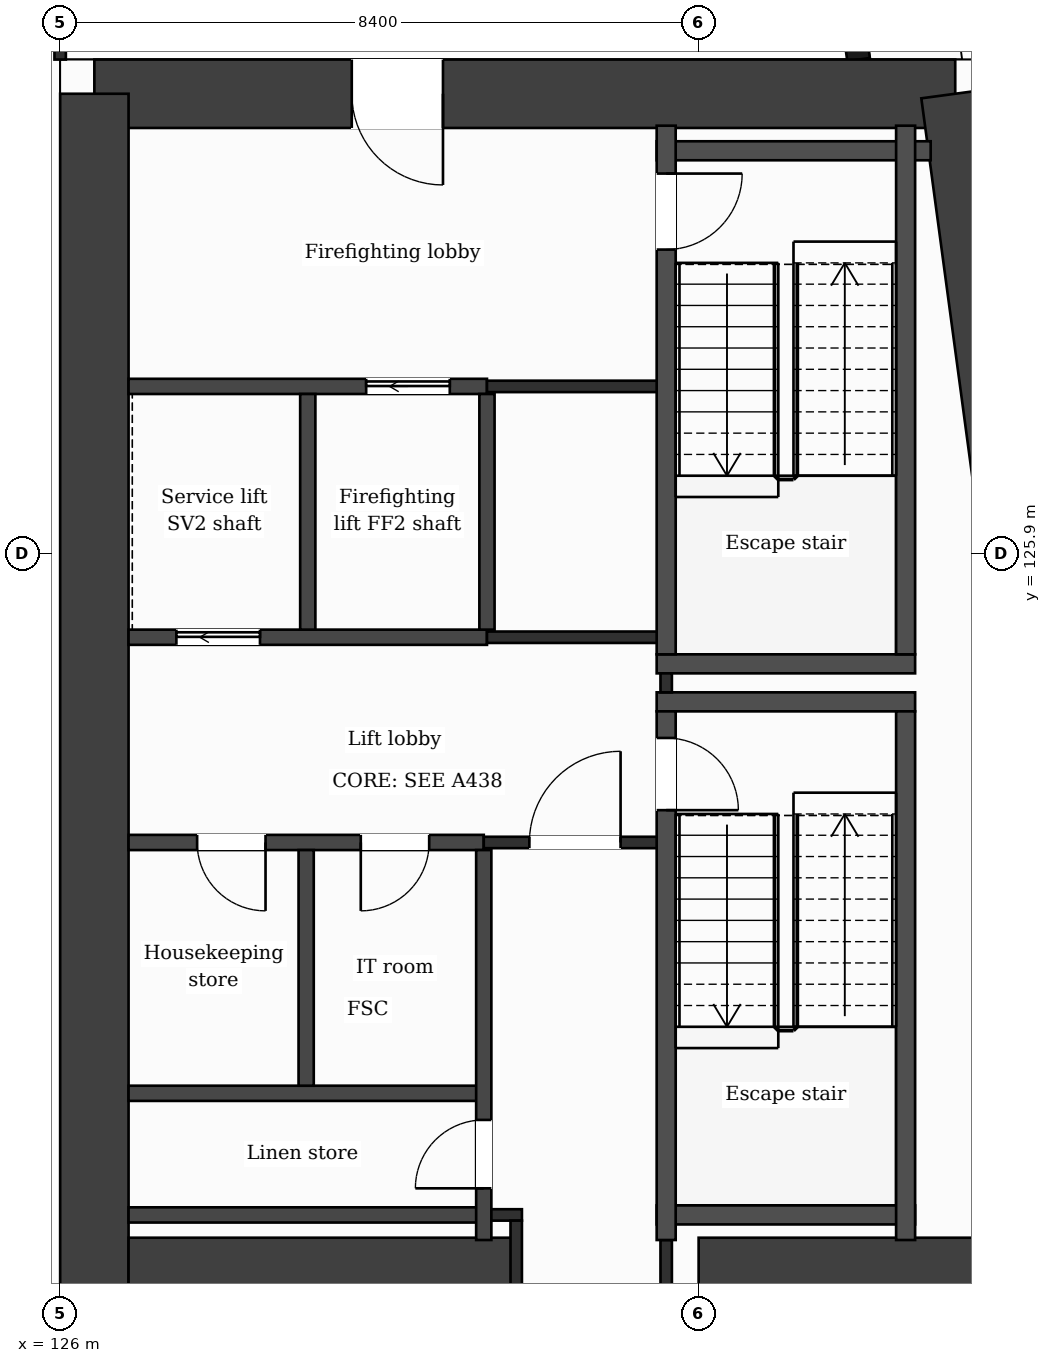
"""IFC4 building model, lengths in metres.
Left out: names, types, materials, properties, quantities, classifications, styles, units other than length and angle.
Written with IfcOpenShell. Run it as: python <this file> out.ifc"""

import sys

from ifc_helpers import new_model, si_unit, direction, frame, frame_2d, origin, place, context, subcontext, project, spatial, rectangle, extrude, element, fill, save


model = new_model("IFC4")
c1 = context("Model", 3, precision=1e-05, world=origin(), true_north=direction((0.0, 1.0)))
c2 = subcontext(c1, "Body", "Model", "MODEL_VIEW")
j1 = project(units=[si_unit("LENGTHUNIT", "METRE"), si_unit("PLANEANGLEUNIT", "RADIAN")], contexts=[c1])
p1 = place(None, origin())
s1 = spatial("IfcSite", under=j1, at=p1, CompositionType="ELEMENT")
p2 = place(p1, origin())
s2 = spatial("IfcBuilding", under=s1, at=p2, CompositionType="ELEMENT")
p3 = place(p2, frame((0.0, 0.0, 158.9)))
s3 = spatial("IfcBuildingStorey", under=s2, at=p3, CompositionType="ELEMENT", Elevation=158.9)
p4 = place(p3, frame((126.45, 131.95, 0.0), z_axis=(0.0, 0.0, 1.0), x_axis=(1.0, 0.0, 0.0)))
e1 = element("IfcWall", 1, at=p4, inside=s3, PredefinedType="SHEAR", context=c2, shape_type="SweptSolid", body=[
    extrude(rectangle(XDim=11.326, YDim=0.9, at=frame_2d((5.663, 0.0))), origin(), (0.0, 0.0, 1.0), 3.7),
])
p5 = place(p4, frame((3.386, 0.0, 0.0)))
e2 = element("IfcOpeningElement", 2, at=p5, cuts=e1, PredefinedType="OPENING", context=c2, shape_type="SweptSolid", body=[
    extrude(rectangle(XDim=1.2, YDim=2.1, at=frame_2d((0.6, 1.05))), frame((0.0, 0.46, 0.0), z_axis=(0.0, -1.0, 0.0), x_axis=(1.0, 0.0, 0.0)), (0.0, 0.0, 1.0), 0.92),
])
p6 = place(p3, frame((137.776, 131.95, 0.0), z_axis=(0.0, 0.0, 1.0), x_axis=(0.133421759112, -0.991059349482, 0.0)))
e3 = element("IfcWall", 3, at=p6, inside=s3, PredefinedType="SHEAR", context=c2, shape_type="SweptSolid", body=[
    extrude(rectangle(XDim=21.29, YDim=0.9, at=frame_2d((10.645, 0.0))), origin(), (0.0, 0.0, 1.0), 3.7),
])
p7 = place(p3, frame((126.45, 110.85, 0.0), z_axis=(0.0, 0.0, 1.0), x_axis=(0.0, 1.0, 0.0)))
e4 = element("IfcWall", 4, at=p7, inside=s3, PredefinedType="SHEAR", context=c2, shape_type="SweptSolid", body=[
    extrude(rectangle(XDim=21.1, YDim=0.9, at=frame_2d((10.55, 0.0))), origin(), (0.0, 0.0, 1.0), 3.7),
])
p8 = place(p3, frame((126.9, 116.45, 0.0), z_axis=(0.0, 0.0, 1.0), x_axis=(1.0, 0.0, 0.0)))
e5 = element("IfcWall", 5, at=p8, inside=s3, PredefinedType="SHEAR", context=c2, shape_type="SweptSolid", body=[
    extrude(rectangle(XDim=5.1, YDim=0.9, at=frame_2d((2.55, 0.0))), origin(), (0.0, 0.0, 1.0), 3.7),
])
p9 = place(p3, frame((134.4, 116.45, 0.0), z_axis=(0.0, 0.0, 1.0), x_axis=(1.0, 0.0, 0.0)))
e6 = element("IfcWall", 6, at=p9, inside=s3, PredefinedType="SHEAR", context=c2, shape_type="SweptSolid", body=[
    extrude(rectangle(XDim=5.077, YDim=0.9, at=frame_2d((2.539, 0.0))), origin(), (0.0, 0.0, 1.0), 3.7),
])
p10 = place(p3, frame((136.504, 132.4, 0.0), z_axis=(0.0, 0.0, 1.0), x_axis=(-0.133399697462, 0.99106231929, 0.0)))
e7 = element("IfcWall", 7, at=p10, inside=s3, PredefinedType="SOLIDWALL", context=c2, shape_type="SweptSolid", body=[
    extrude(rectangle(XDim=6.74, YDim=0.3, at=frame_2d((3.37, 0.0))), origin(), (0.0, 0.0, 1.0), 3.38),
])
p11 = place(p10, frame((1.115, 0.0, 0.0)))
e8 = element("IfcOpeningElement", 8, at=p11, cuts=e7, PredefinedType="OPENING", context=c2, shape_type="SweptSolid", body=[
    extrude(rectangle(XDim=1.2, YDim=2.4, at=frame_2d((0.6, 1.2))), frame((0.0, 0.16, 0.0), z_axis=(0.0, -1.0, 0.0), x_axis=(1.0, 0.0, 0.0)), (0.0, 0.0, 1.0), 0.32),
])
p12 = place(p10, frame((4.436, 0.0, 0.9)))
e9 = element("IfcOpeningElement", 9, at=p12, cuts=e7, PredefinedType="OPENING", context=c2, shape_type="SweptSolid", body=[
    extrude(rectangle(XDim=1.2, YDim=2.1, at=frame_2d((0.6, 1.05))), frame((0.0, 0.16, 0.0), z_axis=(0.0, -1.0, 0.0), x_axis=(1.0, 0.0, 0.0)), (0.0, 0.0, 1.0), 0.32),
])
p13 = place(p3, frame((126.9, 117.2, 0.0), z_axis=(0.0, 0.0, 1.0), x_axis=(1.0, 0.0, 0.0)))
e10 = element("IfcWall", 10, at=p13, inside=s3, PredefinedType="PARTITIONING", context=c2, shape_type="SweptSolid", body=[
    extrude(rectangle(XDim=4.673, YDim=0.2, at=frame_2d((2.336, 0.0))), origin(), (0.0, 0.0, 1.0), 3.38),
])
p14 = place(p3, frame((131.573, 117.2, 0.0), z_axis=(0.0, 0.0, 1.0), x_axis=(1.0, 0.0, 0.0)))
e11 = element("IfcWall", 11, at=p14, inside=s3, PredefinedType="PARTITIONING", context=c2, shape_type="SweptSolid", body=[
    extrude(rectangle(XDim=0.502, YDim=0.15, at=frame_2d((0.251, 0.0))), origin(), (0.0, 0.0, 1.0), 3.38),
])
p15 = place(p3, frame((133.848, 117.2, 0.0), z_axis=(0.0, 0.0, 1.0), x_axis=(1.0, 0.0, 0.0)))
e12 = element("IfcWall", 12, at=p15, inside=s3, PredefinedType="PARTITIONING", context=c2, shape_type="SweptSolid", body=[
    extrude(rectangle(XDim=3.4, YDim=0.25, at=frame_2d((1.7, 0.0))), origin(), (0.0, 0.0, 1.0), 3.38),
])
p16 = place(p3, frame((126.9, 118.8, 0.0), z_axis=(0.0, 0.0, 1.0), x_axis=(1.0, 0.0, 0.0)))
e13 = element("IfcWall", 13, at=p16, inside=s3, PredefinedType="PARTITIONING", context=c2, shape_type="SweptSolid", body=[
    extrude(rectangle(XDim=4.673, YDim=0.2, at=frame_2d((2.336, 0.0))), origin(), (0.0, 0.0, 1.0), 3.38),
])
p17 = place(p3, frame((126.9, 122.1, 0.0), z_axis=(0.0, 0.0, 1.0), x_axis=(1.0, 0.0, 0.0)))
e14 = element("IfcWall", 14, at=p17, inside=s3, PredefinedType="PARTITIONING", context=c2, shape_type="SweptSolid", body=[
    extrude(rectangle(XDim=4.673, YDim=0.2, at=frame_2d((2.336, 0.0))), origin(), (0.0, 0.0, 1.0), 3.38),
])
p18 = place(p17, frame((3.055, 0.0, 0.0)))
e15 = element("IfcOpeningElement", 15, at=p18, cuts=e14, PredefinedType="OPENING", context=c2, shape_type="SweptSolid", body=[
    extrude(rectangle(XDim=0.9, YDim=2.1, at=frame_2d((0.45, 1.05))), frame((0.0, 0.11, 0.0), z_axis=(0.0, -1.0, 0.0), x_axis=(1.0, 0.0, 0.0)), (0.0, 0.0, 1.0), 0.22),
])
p19 = place(p17, frame((0.902, 0.0, 0.0)))
e16 = element("IfcOpeningElement", 16, at=p19, cuts=e14, PredefinedType="OPENING", context=c2, shape_type="SweptSolid", body=[
    extrude(rectangle(XDim=0.9, YDim=2.1, at=frame_2d((0.45, 1.05))), frame((0.0, 0.11, 0.0), z_axis=(0.0, -1.0, 0.0), x_axis=(1.0, 0.0, 0.0)), (0.0, 0.0, 1.0), 0.22),
])
p20 = place(p3, frame((131.573, 122.1, 0.0), z_axis=(0.0, 0.0, 1.0), x_axis=(1.0, 0.0, 0.0)))
e17 = element("IfcWall", 17, at=p20, inside=s3, PredefinedType="PARTITIONING", context=c2, shape_type="SweptSolid", body=[
    extrude(rectangle(XDim=2.4, YDim=0.15, at=frame_2d((1.2, 0.0))), origin(), (0.0, 0.0, 1.0), 3.38),
])
p21 = place(p20, frame((0.6, 0.0, 0.0)))
e18 = element("IfcOpeningElement", 18, at=p21, cuts=e17, PredefinedType="OPENING", context=c2, shape_type="SweptSolid", body=[
    extrude(rectangle(XDim=1.2, YDim=2.1, at=frame_2d((0.6, 1.05))), frame((0.0, 0.085, 0.0), z_axis=(0.0, -1.0, 0.0), x_axis=(1.0, 0.0, 0.0)), (0.0, 0.0, 1.0), 0.17),
])
for number, where, z_axis, x_axis in (
    (19, (133.848, 123.95, 0.0), (0.0, 0.0, 1.0), (1.0, 0.0, 0.0)),
    (20, (133.848, 124.45, 0.0), (0.0, 0.0, 1.0), (1.0, 0.0, 0.0)),
):
    element("IfcWall", number, at=place(p3, frame(where, z_axis=z_axis, x_axis=x_axis)), inside=s3, PredefinedType="PARTITIONING", context=c2, shape_type="SweptSolid", body=[
        extrude(rectangle(XDim=3.4, YDim=0.25, at=frame_2d((1.7, 0.0))), origin(), (0.0, 0.0, 1.0), 3.38),
    ])
p22 = place(p3, frame((126.9, 124.8, 0.0), z_axis=(0.0, 0.0, 1.0), x_axis=(1.0, 0.0, 0.0)))
e21 = element("IfcWall", 21, at=p22, inside=s3, PredefinedType="PARTITIONING", context=c2, shape_type="SweptSolid", body=[
    extrude(rectangle(XDim=4.715, YDim=0.2, at=frame_2d((2.358, 0.0))), origin(), (0.0, 0.0, 1.0), 3.38),
])
p23 = place(p22, frame((0.629, 0.0, 0.0)))
e22 = element("IfcOpeningElement", 22, at=p23, cuts=e21, PredefinedType="OPENING", context=c2, shape_type="SweptSolid", body=[
    extrude(rectangle(XDim=1.1, YDim=2.1, at=frame_2d((0.55, 1.05))), frame((0.0, 0.11, 0.0), z_axis=(0.0, -1.0, 0.0), x_axis=(1.0, 0.0, 0.0)), (0.0, 0.0, 1.0), 0.22),
])
p24 = place(p3, frame((131.615, 124.8, 0.0), z_axis=(0.0, 0.0, 1.0), x_axis=(1.0, 0.0, 0.0)))
e23 = element("IfcWall", 23, at=p24, inside=s3, PredefinedType="PARTITIONING", context=c2, shape_type="SweptSolid", body=[
    extrude(rectangle(XDim=2.483, YDim=0.15, at=frame_2d((1.241, 0.0))), origin(), (0.0, 0.0, 1.0), 3.38),
])
p25 = place(p3, frame((126.9, 128.1, 0.0), z_axis=(0.0, 0.0, 1.0), x_axis=(1.0, 0.0, 0.0)))
e24 = element("IfcWall", 24, at=p25, inside=s3, PredefinedType="PARTITIONING", context=c2, shape_type="SweptSolid", body=[
    extrude(rectangle(XDim=4.715, YDim=0.2, at=frame_2d((2.358, 0.0))), origin(), (0.0, 0.0, 1.0), 3.38),
])
p26 = place(p25, frame((3.126, 0.0, 0.0)))
e25 = element("IfcOpeningElement", 25, at=p26, cuts=e24, PredefinedType="OPENING", context=c2, shape_type="SweptSolid", body=[
    extrude(rectangle(XDim=1.1, YDim=2.1, at=frame_2d((0.55, 1.05))), frame((0.0, 0.11, 0.0), z_axis=(0.0, -1.0, 0.0), x_axis=(1.0, 0.0, 0.0)), (0.0, 0.0, 1.0), 0.22),
])
p27 = place(p3, frame((131.615, 128.1, 0.0), z_axis=(0.0, 0.0, 1.0), x_axis=(1.0, 0.0, 0.0)))
e26 = element("IfcWall", 26, at=p27, inside=s3, PredefinedType="PARTITIONING", context=c2, shape_type="SweptSolid", body=[
    extrude(rectangle(XDim=2.358, YDim=0.15, at=frame_2d((1.179, 0.0))), origin(), (0.0, 0.0, 1.0), 3.38),
])
p28 = place(p3, frame((133.848, 131.2, 0.0), z_axis=(0.0, 0.0, 1.0), x_axis=(1.0, 0.0, 0.0)))
e27 = element("IfcWall", 27, at=p28, inside=s3, PredefinedType="PARTITIONING", context=c2, shape_type="SweptSolid", body=[
    extrude(rectangle(XDim=3.605, YDim=0.25, at=frame_2d((1.802, 0.0))), origin(), (0.0, 0.0, 1.0), 3.38),
])
p29 = place(p3, frame((126.0, 132.4, 0.0), z_axis=(0.0, 0.0, 1.0), x_axis=(0.0, 1.0, 0.0)))
e28 = element("IfcWall", 28, at=p29, inside=s3, PredefinedType="PARTITIONING", context=c2, shape_type="SweptSolid", body=[
    extrude(rectangle(XDim=1.325, YDim=0.15, at=frame_2d((0.663, 0.0))), origin(), (0.0, 0.0, 1.0), 3.38),
])
for number, where, z_axis, x_axis in (
    (29, (129.237, 118.9, 0.0), (0.0, 0.0, 1.0), (0.0, 1.0, 0.0)),
    (30, (129.258, 124.9, 0.0), (0.0, 0.0, 1.0), (0.0, 1.0, 0.0)),
):
    element("IfcWall", number, at=place(p3, frame(where, z_axis=z_axis, x_axis=x_axis)), inside=s3, PredefinedType="PARTITIONING", context=c2, shape_type="SweptSolid", body=[
        extrude(rectangle(XDim=3.1, YDim=0.2, at=frame_2d((1.55, 0.0))), origin(), (0.0, 0.0, 1.0), 3.38),
    ])
p30 = place(p3, frame((131.573, 116.87, 0.0), z_axis=(0.0, 0.0, 1.0), x_axis=(0.0, 1.0, 0.0)))
e31 = element("IfcWall", 31, at=p30, inside=s3, PredefinedType="PARTITIONING", context=c2, shape_type="SweptSolid", body=[
    extrude(rectangle(XDim=5.13, YDim=0.2, at=frame_2d((2.565, 0.0))), origin(), (0.0, 0.0, 1.0), 3.38),
])
p31 = place(p30, frame((0.68, 0.0, 0.0)))
e32 = element("IfcOpeningElement", 32, at=p31, cuts=e31, PredefinedType="OPENING", context=c2, shape_type="SweptSolid", body=[
    extrude(rectangle(XDim=0.9, YDim=2.1, at=frame_2d((0.45, 1.05))), frame((0.0, 0.11, 0.0), z_axis=(0.0, -1.0, 0.0), x_axis=(1.0, 0.0, 0.0)), (0.0, 0.0, 1.0), 0.22),
])
p32 = place(p3, frame((131.615, 124.9, 0.0), z_axis=(0.0, 0.0, 1.0), x_axis=(0.0, 1.0, 0.0)))
e33 = element("IfcWall", 33, at=p32, inside=s3, PredefinedType="PARTITIONING", context=c2, shape_type="SweptSolid", body=[
    extrude(rectangle(XDim=3.1, YDim=0.2, at=frame_2d((1.55, 0.0))), origin(), (0.0, 0.0, 1.0), 3.38),
])
p33 = place(p3, frame((132.0, 116.0, 0.0), z_axis=(0.0, 0.0, 1.0), x_axis=(0.0, 1.0, 0.0)))
e34 = element("IfcWall", 34, at=p33, inside=s3, PredefinedType="PARTITIONING", context=c2, shape_type="SweptSolid", body=[
    extrude(rectangle(XDim=1.125, YDim=0.15, at=frame_2d((0.562, 0.0))), origin(), (0.0, 0.0, 1.0), 3.38),
])
p34 = place(p3, frame((133.973, 116.0, 0.0), z_axis=(0.0, 0.0, 1.0), x_axis=(0.0, 1.0, 0.0)))
e35 = element("IfcWall", 35, at=p34, inside=s3, PredefinedType="PARTITIONING", context=c2, shape_type="SweptSolid", body=[
    extrude(rectangle(XDim=0.87, YDim=0.15, at=frame_2d((0.435, 0.0))), origin(), (0.0, 0.0, 1.0), 3.38),
])
p35 = place(p3, frame((133.973, 124.075, 0.0), z_axis=(0.0, 0.0, 1.0), x_axis=(0.0, 1.0, 0.0)))
e36 = element("IfcWall", 36, at=p35, inside=s3, PredefinedType="PARTITIONING", context=c2, shape_type="SweptSolid", body=[
    extrude(rectangle(XDim=0.25, YDim=0.15, at=frame_2d((0.125, 0.0))), origin(), (0.0, 0.0, 1.0), 3.38),
])
p36 = place(p3, frame((133.973, 116.87, 0.0), z_axis=(0.0, 0.0, 1.0), x_axis=(0.0, 1.0, 0.0)))
e37 = element("IfcWall", 37, at=p36, inside=s3, PredefinedType="PARTITIONING", context=c2, shape_type="SweptSolid", body=[
    extrude(rectangle(XDim=6.955, YDim=0.25, at=frame_2d((3.478, 0.0))), origin(), (0.0, 0.0, 1.0), 3.38),
])
p37 = place(p36, frame((5.655, 0.0, 0.0)))
e38 = element("IfcOpeningElement", 38, at=p37, cuts=e37, PredefinedType="OPENING", context=c2, shape_type="SweptSolid", body=[
    extrude(rectangle(XDim=0.95, YDim=2.1, at=frame_2d((0.475, 1.05))), frame((0.0, 0.135, 0.0), z_axis=(0.0, -1.0, 0.0), x_axis=(1.0, 0.0, 0.0)), (0.0, 0.0, 1.0), 0.27),
])
p38 = place(p3, frame((133.973, 124.575, 0.0), z_axis=(0.0, 0.0, 1.0), x_axis=(0.0, 1.0, 0.0)))
e39 = element("IfcWall", 39, at=p38, inside=s3, PredefinedType="PARTITIONING", context=c2, shape_type="SweptSolid", body=[
    extrude(rectangle(XDim=6.955, YDim=0.25, at=frame_2d((3.478, 0.0))), origin(), (0.0, 0.0, 1.0), 3.38),
])
p39 = place(p38, frame((5.325, 0.0, 0.0)))
e40 = element("IfcOpeningElement", 40, at=p39, cuts=e39, PredefinedType="OPENING", context=c2, shape_type="SweptSolid", body=[
    extrude(rectangle(XDim=1.0, YDim=2.1, at=frame_2d((0.5, 1.05))), frame((0.0, 0.135, 0.0), z_axis=(0.0, -1.0, 0.0), x_axis=(1.0, 0.0, 0.0)), (0.0, 0.0, 1.0), 0.27),
])
p40 = place(p3, frame((137.123, 116.87, 0.0), z_axis=(0.0, 0.0, 1.0), x_axis=(0.0, 1.0, 0.0)))
e41 = element("IfcWall", 41, at=p40, inside=s3, PredefinedType="PARTITIONING", context=c2, shape_type="SweptSolid", body=[
    extrude(rectangle(XDim=6.955, YDim=0.25, at=frame_2d((3.478, 0.0))), origin(), (0.0, 0.0, 1.0), 3.38),
])
p41 = place(p3, frame((137.123, 124.575, 0.0), z_axis=(0.0, 0.0, 1.0), x_axis=(0.0, 1.0, 0.0)))
e42 = element("IfcWall", 42, at=p41, inside=s3, PredefinedType="PARTITIONING", context=c2, shape_type="SweptSolid", body=[
    extrude(rectangle(XDim=6.955, YDim=0.25, at=frame_2d((3.478, 0.0))), origin(), (0.0, 0.0, 1.0), 3.38),
])
p42 = place(p21, origin())
e43 = element("IfcDoor", 43, at=p42, inside=s3, OperationType="SINGLE_SWING_RIGHT", PredefinedType="DOOR", context=c2, shape_type="SweptSolid", body=[
    extrude(rectangle(XDim=1.2, YDim=2.1, at=frame_2d((0.6, 1.05))), frame((0.0, 0.025, 0.0), z_axis=(0.0, -1.0, 0.0), x_axis=(1.0, 0.0, 0.0)), (0.0, 0.0, 1.0), 0.05),
])
fill(e18, e43)
p43 = place(p26, origin())
e44 = element("IfcDoor", 44, at=p43, inside=s3, OperationType="SLIDING_TO_LEFT", PredefinedType="DOOR", context=c2, shape_type="SweptSolid", body=[
    extrude(rectangle(XDim=1.1, YDim=2.1, at=frame_2d((0.55, 1.05))), frame((0.0, 0.025, 0.0), z_axis=(0.0, -1.0, 0.0), x_axis=(1.0, 0.0, 0.0)), (0.0, 0.0, 1.0), 0.05),
])
fill(e25, e44)
p44 = place(p23, origin())
e45 = element("IfcDoor", 45, at=p44, inside=s3, OperationType="SLIDING_TO_LEFT", PredefinedType="DOOR", context=c2, shape_type="SweptSolid", body=[
    extrude(rectangle(XDim=1.1, YDim=2.1, at=frame_2d((0.55, 1.05))), frame((0.0, 0.025, 0.0), z_axis=(0.0, -1.0, 0.0), x_axis=(1.0, 0.0, 0.0)), (0.0, 0.0, 1.0), 0.05),
])
fill(e22, e45)
p45 = place(p18, origin())
e46 = element("IfcDoor", 46, at=p45, inside=s3, OperationType="SINGLE_SWING_LEFT", PredefinedType="DOOR", context=c2, shape_type="SweptSolid", body=[
    extrude(rectangle(XDim=0.9, YDim=2.1, at=frame_2d((0.45, 1.05))), frame((0.0, 0.025, 0.0), z_axis=(0.0, -1.0, 0.0), x_axis=(1.0, 0.0, 0.0)), (0.0, 0.0, 1.0), 0.05),
])
fill(e15, e46)
p46 = place(p19, origin())
e47 = element("IfcDoor", 47, at=p46, inside=s3, OperationType="SINGLE_SWING_RIGHT", PredefinedType="DOOR", context=c2, shape_type="SweptSolid", body=[
    extrude(rectangle(XDim=0.9, YDim=2.1, at=frame_2d((0.45, 1.05))), frame((0.0, 0.025, 0.0), z_axis=(0.0, -1.0, 0.0), x_axis=(1.0, 0.0, 0.0)), (0.0, 0.0, 1.0), 0.05),
])
fill(e16, e47)
p47 = place(p37, origin())
e48 = element("IfcDoor", 48, at=p47, inside=s3, OperationType="SINGLE_SWING_LEFT", PredefinedType="DOOR", context=c2, shape_type="SweptSolid", body=[
    extrude(rectangle(XDim=0.95, YDim=2.1, at=frame_2d((0.475, 1.05))), frame((0.0, 0.025, 0.0), z_axis=(0.0, -1.0, 0.0), x_axis=(1.0, 0.0, 0.0)), (0.0, 0.0, 1.0), 0.05),
])
fill(e38, e48)
p48 = place(p39, origin())
e49 = element("IfcDoor", 49, at=p48, inside=s3, OperationType="SINGLE_SWING_RIGHT", PredefinedType="DOOR", context=c2, shape_type="SweptSolid", body=[
    extrude(rectangle(XDim=1.0, YDim=2.1, at=frame_2d((0.5, 1.05))), frame((0.0, 0.025, 0.0), z_axis=(0.0, -1.0, 0.0), x_axis=(1.0, 0.0, 0.0)), (0.0, 0.0, 1.0), 0.05),
])
fill(e40, e49)
p49 = place(p31, origin())
e50 = element("IfcDoor", 50, at=p49, inside=s3, OperationType="SINGLE_SWING_LEFT", PredefinedType="DOOR", context=c2, shape_type="SweptSolid", body=[
    extrude(rectangle(XDim=0.9, YDim=2.1, at=frame_2d((0.45, 1.05))), frame((0.0, 0.025, 0.0), z_axis=(0.0, -1.0, 0.0), x_axis=(1.0, 0.0, 0.0)), (0.0, 0.0, 1.0), 0.05),
])
fill(e32, e50)
p50 = place(p5, origin())
e51 = element("IfcDoor", 51, at=p50, inside=s3, OperationType="SINGLE_SWING_RIGHT", PredefinedType="DOOR", context=c2, shape_type="SweptSolid", body=[
    extrude(rectangle(XDim=1.2, YDim=2.1, at=frame_2d((0.6, 1.05))), frame((0.0, 0.025, 0.0), z_axis=(0.0, -1.0, 0.0), x_axis=(1.0, 0.0, 0.0)), (0.0, 0.0, 1.0), 0.05),
])
fill(e2, e51)
save(model, sys.argv[1])
